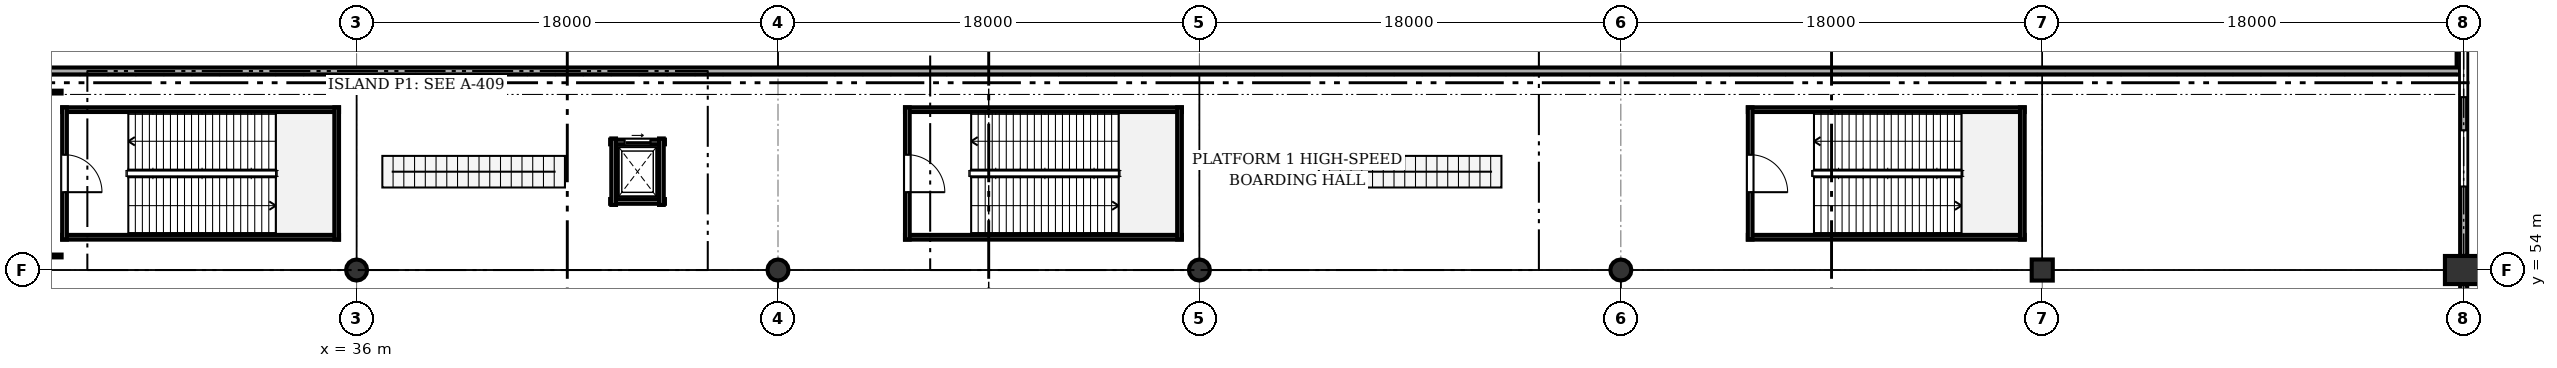
"""IFC4 building model, lengths in metres.
Left out: names, types, materials, properties, quantities, classifications, styles, units other than length and angle.
Written with IfcOpenShell. Run it as: python <this file> out.ifc"""

import sys

from ifc_helpers import new_model, si_unit, direction, frame, frame_2d, origin, origin_2d, place, context, subcontext, project, spatial, rectangle, circle, extrude, element, fill, save


model = new_model("IFC4")
c1 = context("Model", 3, precision=1e-05, world=origin(), true_north=direction((0.0, 1.0)))
c2 = subcontext(c1, "Body", "Model", "MODEL_VIEW")
j1 = project(units=[si_unit("LENGTHUNIT", "METRE"), si_unit("PLANEANGLEUNIT", "RADIAN")], contexts=[c1])
p1 = place(None, origin())
s1 = spatial("IfcSite", under=j1, at=p1, CompositionType="ELEMENT")
p2 = place(p1, origin())
s2 = spatial("IfcBuilding", under=s1, at=p2, CompositionType="ELEMENT")
p3 = place(p2, origin())
s3 = spatial("IfcBuildingStorey", under=s2, at=p3, CompositionType="ELEMENT", Elevation=0.0)
for number, where, z_axis, x_axis in (
    (1, (36.0, 54.0, 0.0), (0.0, 0.0, 1.0), (1.0, 0.0, 0.0)),
    (2, (54.0, 54.0, 0.0), (0.0, 0.0, 1.0), (1.0, 0.0, 0.0)),
    (3, (72.0, 54.0, 0.0), (0.0, 0.0, 1.0), (1.0, 0.0, 0.0)),
    (4, (90.0, 54.0, 0.0), (0.0, 0.0, 1.0), (1.0, 0.0, 0.0)),
):
    element("IfcColumn", number, at=place(p3, frame(where, z_axis=z_axis, x_axis=x_axis)), inside=s3, PredefinedType="COLUMN", context=c2, shape_type="SweptSolid", body=[
        extrude(circle(Radius=0.45, at=origin_2d()), origin(), (0.0, 0.0, 1.0), 6.6),
    ])
p4 = place(p3, frame((108.0, 54.0, 0.0), z_axis=(0.0, 0.0, 1.0), x_axis=(1.0, 0.0, 0.0)))
e5 = element("IfcColumn", 5, at=p4, inside=s3, PredefinedType="COLUMN", context=c2, shape_type="SweptSolid", body=[
    extrude(rectangle(XDim=0.9, YDim=0.9, at=origin_2d()), origin(), (0.0, 0.0, 1.0), 6.6),
])
p5 = place(p3, frame((126.0, 54.0, 0.0), z_axis=(0.0, 0.0, 1.0), x_axis=(1.0, 0.0, 0.0)))
e6 = element("IfcColumn", 6, at=p5, inside=s3, PredefinedType="COLUMN", context=c2, shape_type="SweptSolid", body=[
    extrude(rectangle(XDim=1.6, YDim=1.2, at=origin_2d()), origin(), (0.0, 0.0, 1.0), 6.6),
])
p6 = place(p3, frame((125.85, 62.5, -1.25), z_axis=(0.0, 0.0, 1.0), x_axis=(0.0, 1.0, 0.0)))
e7 = element("IfcWall", 7, at=p6, inside=s3, PredefinedType="SOLIDWALL", context=c2, shape_type="SweptSolid", body=[
    extrude(rectangle(XDim=4.0, YDim=0.3, at=frame_2d((2.0, 0.0))), origin(), (0.0, 0.0, 1.0), 1.23),
])
p7 = place(p3, frame((0.15, 62.5, -1.25), z_axis=(0.0, 0.0, 1.0), x_axis=(1.0, 0.0, 0.0)))
e8 = element("IfcWall", 8, at=p7, inside=s3, PredefinedType="SOLIDWALL", context=c2, shape_type="SweptSolid", body=[
    extrude(rectangle(XDim=125.7, YDim=0.3, at=frame_2d((62.85, 0.0))), origin(), (0.0, 0.0, 1.0), 0.87),
])
p8 = place(p3, frame((126.0, 53.4, 0.0), z_axis=(0.0, 0.0, 1.0), x_axis=(0.0, -1.0, 0.0)))
e9 = element("IfcWall", 9, at=p8, inside=s3, PredefinedType="SOLIDWALL", context=c2, shape_type="SweptSolid", body=[
    extrude(rectangle(XDim=10.8, YDim=0.3, at=frame_2d((5.4, 0.0))), origin(), (0.0, 0.0, 1.0), 6.225),
])
p9 = place(p8, frame((2.467, 0.0, 0.0)))
e10 = element("IfcOpeningElement", 10, at=p9, cuts=e9, PredefinedType="OPENING", context=c2, shape_type="SweptSolid", body=[
    extrude(rectangle(XDim=2.4, YDim=2.5, at=frame_2d((1.2, 1.25))), frame((0.0, 0.16, 0.0), z_axis=(0.0, -1.0, 0.0), x_axis=(1.0, 0.0, 0.0)), (0.0, 0.0, 1.0), 0.32),
])
p10 = place(p8, frame((5.633, 0.0, 0.95)))
e11 = element("IfcOpeningElement", 11, at=p10, cuts=e9, PredefinedType="OPENING", context=c2, shape_type="SweptSolid", body=[
    extrude(rectangle(XDim=3.0, YDim=2.1, at=frame_2d((1.5, 1.05))), frame((0.0, 0.16, 0.0), z_axis=(0.0, -1.0, 0.0), x_axis=(1.0, 0.0, 0.0)), (0.0, 0.0, 1.0), 0.32),
])
p11 = place(p3, frame((126.0, 66.9, 0.0), z_axis=(0.0, 0.0, 1.0), x_axis=(0.0, -1.0, 0.0)))
e12 = element("IfcWall", 12, at=p11, inside=s3, PredefinedType="SOLIDWALL", context=c2, shape_type="SweptSolid", body=[
    extrude(rectangle(XDim=12.3, YDim=0.3, at=frame_2d((6.15, 0.0))), origin(), (0.0, 0.0, 1.0), 5.495),
])
p12 = place(p11, frame((2.817, 0.0, 0.95)))
e13 = element("IfcOpeningElement", 13, at=p12, cuts=e12, PredefinedType="OPENING", context=c2, shape_type="SweptSolid", body=[
    extrude(rectangle(XDim=2.7, YDim=2.1, at=frame_2d((1.35, 1.05))), frame((0.0, 0.16, 0.0), z_axis=(0.0, -1.0, 0.0), x_axis=(1.0, 0.0, 0.0)), (0.0, 0.0, 1.0), 0.32),
])
p13 = place(p11, frame((6.933, 0.0, 0.95)))
e14 = element("IfcOpeningElement", 14, at=p13, cuts=e12, PredefinedType="OPENING", context=c2, shape_type="SweptSolid", body=[
    extrude(rectangle(XDim=2.4, YDim=2.1, at=frame_2d((1.2, 1.05))), frame((0.0, 0.16, 0.0), z_axis=(0.0, -1.0, 0.0), x_axis=(1.0, 0.0, 0.0)), (0.0, 0.0, 1.0), 0.32),
])
for number, where, z_axis, x_axis in (
    (15, (23.425, 55.4, 0.0), (0.0, 0.0, 1.0), (1.0, 0.0, 0.0)),
    (16, (35.25, 60.85, 0.0), (0.0, 0.0, 1.0), (-1.0, 0.0, 0.0)),
):
    element("IfcWall", number, at=place(p3, frame(where, z_axis=z_axis, x_axis=x_axis)), inside=s3, PredefinedType="SOLIDWALL", context=c2, shape_type="SweptSolid", body=[
        extrude(rectangle(XDim=11.825, YDim=0.2, at=frame_2d((5.913, 0.0))), origin(), (0.0, 0.0, 1.0), 6.32),
    ])
p14 = place(p3, frame((35.15, 55.3, 0.0), z_axis=(0.0, 0.0, 1.0), x_axis=(0.0, 1.0, 0.0)))
e17 = element("IfcWall", 17, at=p14, inside=s3, PredefinedType="SOLIDWALL", context=c2, shape_type="SweptSolid", body=[
    extrude(rectangle(XDim=5.65, YDim=0.2, at=frame_2d((2.825, 0.0))), origin(), (0.0, 0.0, 1.0), 6.32),
])
p15 = place(p3, frame((23.525, 60.95, 0.0), z_axis=(0.0, 0.0, 1.0), x_axis=(0.0, -1.0, 0.0)))
e18 = element("IfcWall", 18, at=p15, inside=s3, PredefinedType="SOLIDWALL", context=c2, shape_type="SweptSolid", body=[
    extrude(rectangle(XDim=5.65, YDim=0.2, at=frame_2d((2.825, 0.0))), origin(), (0.0, 0.0, 1.0), 4.4),
])
p16 = place(p15, frame((2.025, 0.0, 0.0)))
e19 = element("IfcOpeningElement", 19, at=p16, cuts=e18, PredefinedType="OPENING", context=c2, shape_type="SweptSolid", body=[
    extrude(rectangle(XDim=1.6, YDim=2.15, at=frame_2d((0.8, 1.075))), frame((0.0, 0.11, 0.0), z_axis=(0.0, -1.0, 0.0), x_axis=(1.0, 0.0, 0.0)), (0.0, 0.0, 1.0), 0.22),
])
for number, where, z_axis, x_axis in (
    (20, (59.425, 55.4, 0.0), (0.0, 0.0, 1.0), (1.0, 0.0, 0.0)),
    (21, (71.25, 60.85, 0.0), (0.0, 0.0, 1.0), (-1.0, 0.0, 0.0)),
):
    element("IfcWall", number, at=place(p3, frame(where, z_axis=z_axis, x_axis=x_axis)), inside=s3, PredefinedType="SOLIDWALL", context=c2, shape_type="SweptSolid", body=[
        extrude(rectangle(XDim=11.825, YDim=0.2, at=frame_2d((5.913, 0.0))), origin(), (0.0, 0.0, 1.0), 6.32),
    ])
p17 = place(p3, frame((71.15, 55.3, 0.0), z_axis=(0.0, 0.0, 1.0), x_axis=(0.0, 1.0, 0.0)))
e22 = element("IfcWall", 22, at=p17, inside=s3, PredefinedType="SOLIDWALL", context=c2, shape_type="SweptSolid", body=[
    extrude(rectangle(XDim=5.65, YDim=0.2, at=frame_2d((2.825, 0.0))), origin(), (0.0, 0.0, 1.0), 6.32),
])
p18 = place(p3, frame((59.525, 60.95, 0.0), z_axis=(0.0, 0.0, 1.0), x_axis=(0.0, -1.0, 0.0)))
e23 = element("IfcWall", 23, at=p18, inside=s3, PredefinedType="SOLIDWALL", context=c2, shape_type="SweptSolid", body=[
    extrude(rectangle(XDim=5.65, YDim=0.2, at=frame_2d((2.825, 0.0))), origin(), (0.0, 0.0, 1.0), 4.4),
])
p19 = place(p18, frame((2.025, 0.0, 0.0)))
e24 = element("IfcOpeningElement", 24, at=p19, cuts=e23, PredefinedType="OPENING", context=c2, shape_type="SweptSolid", body=[
    extrude(rectangle(XDim=1.6, YDim=2.15, at=frame_2d((0.8, 1.075))), frame((0.0, 0.11, 0.0), z_axis=(0.0, -1.0, 0.0), x_axis=(1.0, 0.0, 0.0)), (0.0, 0.0, 1.0), 0.22),
])
for number, where, z_axis, x_axis in (
    (25, (95.425, 55.4, 0.0), (0.0, 0.0, 1.0), (1.0, 0.0, 0.0)),
    (26, (107.25, 60.85, 0.0), (0.0, 0.0, 1.0), (-1.0, 0.0, 0.0)),
):
    element("IfcWall", number, at=place(p3, frame(where, z_axis=z_axis, x_axis=x_axis)), inside=s3, PredefinedType="SOLIDWALL", context=c2, shape_type="SweptSolid", body=[
        extrude(rectangle(XDim=11.825, YDim=0.2, at=frame_2d((5.913, 0.0))), origin(), (0.0, 0.0, 1.0), 6.32),
    ])
p20 = place(p3, frame((107.15, 55.3, 0.0), z_axis=(0.0, 0.0, 1.0), x_axis=(0.0, 1.0, 0.0)))
e27 = element("IfcWall", 27, at=p20, inside=s3, PredefinedType="SOLIDWALL", context=c2, shape_type="SweptSolid", body=[
    extrude(rectangle(XDim=5.65, YDim=0.2, at=frame_2d((2.825, 0.0))), origin(), (0.0, 0.0, 1.0), 6.32),
])
p21 = place(p3, frame((95.525, 60.95, 0.0), z_axis=(0.0, 0.0, 1.0), x_axis=(0.0, -1.0, 0.0)))
e28 = element("IfcWall", 28, at=p21, inside=s3, PredefinedType="SOLIDWALL", context=c2, shape_type="SweptSolid", body=[
    extrude(rectangle(XDim=5.65, YDim=0.2, at=frame_2d((2.825, 0.0))), origin(), (0.0, 0.0, 1.0), 4.4),
])
p22 = place(p21, frame((2.025, 0.0, 0.0)))
e29 = element("IfcOpeningElement", 29, at=p22, cuts=e28, PredefinedType="OPENING", context=c2, shape_type="SweptSolid", body=[
    extrude(rectangle(XDim=1.6, YDim=2.15, at=frame_2d((0.8, 1.075))), frame((0.0, 0.11, 0.0), z_axis=(0.0, -1.0, 0.0), x_axis=(1.0, 0.0, 0.0)), (0.0, 0.0, 1.0), 0.22),
])
p23 = place(p3, frame((46.83, 56.93, 0.0), z_axis=(0.0, 0.0, 1.0), x_axis=(1.0, 0.0, 0.0)))
e30 = element("IfcWall", 30, at=p23, inside=s3, PredefinedType="SOLIDWALL", context=c2, shape_type="SweptSolid", body=[
    extrude(rectangle(XDim=2.34, YDim=0.2, at=frame_2d((1.17, 0.0))), origin(), (0.0, 0.0, 1.0), 4.4),
])
p24 = place(p3, frame((49.17, 59.47, 0.0), z_axis=(0.0, 0.0, 1.0), x_axis=(-1.0, 0.0, 0.0)))
e31 = element("IfcWall", 31, at=p24, inside=s3, PredefinedType="SOLIDWALL", context=c2, shape_type="SweptSolid", body=[
    extrude(rectangle(XDim=2.34, YDim=0.2, at=frame_2d((1.17, 0.0))), origin(), (0.0, 0.0, 1.0), 4.4),
])
p25 = place(p24, frame((0.62, 0.0, 0.0)))
e32 = element("IfcOpeningElement", 32, at=p25, cuts=e31, PredefinedType="OPENING", context=c2, shape_type="SweptSolid", body=[
    extrude(rectangle(XDim=1.1, YDim=2.15, at=frame_2d((0.55, 1.075))), frame((0.0, 0.11, 0.0), z_axis=(0.0, -1.0, 0.0), x_axis=(1.0, 0.0, 0.0)), (0.0, 0.0, 1.0), 0.22),
])
for number, where, z_axis, x_axis in (
    (33, (46.98, 59.62, 0.0), (0.0, 0.0, 1.0), (0.0, -1.0, 0.0)),
    (34, (49.02, 56.78, 0.0), (0.0, 0.0, 1.0), (0.0, 1.0, 0.0)),
):
    element("IfcWall", number, at=place(p3, frame(where, z_axis=z_axis, x_axis=x_axis)), inside=s3, PredefinedType="SOLIDWALL", context=c2, shape_type="SweptSolid", body=[
        extrude(rectangle(XDim=2.84, YDim=0.2, at=frame_2d((1.42, 0.0))), origin(), (0.0, 0.0, 1.0), 4.4),
    ])
for number, where, z_axis, x_axis in (
    (35, (23.4, 54.6, 0.0), (0.0, 0.0, 1.0), (-1.0, 0.0, 0.0)),
    (36, (0.6, 61.6, 0.0), (0.0, 0.0, 1.0), (1.0, 0.0, 0.0)),
):
    element("IfcWall", number, at=place(p3, frame(where, z_axis=z_axis, x_axis=x_axis)), inside=s3, PredefinedType="PARTITIONING", context=c2, shape_type="SweptSolid", body=[
        extrude(rectangle(XDim=22.8, YDim=0.12, at=frame_2d((11.4, 0.0))), origin(), (0.0, 0.0, 1.0), 4.4),
    ])
p26 = place(p12, origin())
e37 = element("IfcWindow", 37, at=p26, inside=s3, PartitioningType="SINGLE_PANEL", PredefinedType="WINDOW", context=c2, shape_type="SweptSolid", body=[
    extrude(rectangle(XDim=2.7, YDim=2.1, at=frame_2d((1.35, 1.05))), frame((0.0, 0.03, 0.0), z_axis=(0.0, -1.0, 0.0), x_axis=(1.0, 0.0, 0.0)), (0.0, 0.0, 1.0), 0.06),
])
fill(e13, e37)
p27 = place(p13, origin())
e38 = element("IfcWindow", 38, at=p27, inside=s3, PartitioningType="SINGLE_PANEL", PredefinedType="WINDOW", context=c2, shape_type="SweptSolid", body=[
    extrude(rectangle(XDim=2.4, YDim=2.1, at=frame_2d((1.2, 1.05))), frame((0.0, 0.03, 0.0), z_axis=(0.0, -1.0, 0.0), x_axis=(1.0, 0.0, 0.0)), (0.0, 0.0, 1.0), 0.06),
])
fill(e14, e38)
p28 = place(p16, origin())
e39 = element("IfcDoor", 39, at=p28, inside=s3, OperationType="SINGLE_SWING_RIGHT", PredefinedType="DOOR", context=c2, shape_type="SweptSolid", body=[
    extrude(rectangle(XDim=1.6, YDim=2.15, at=frame_2d((0.8, 1.075))), frame((0.0, 0.025, 0.0), z_axis=(0.0, -1.0, 0.0), x_axis=(1.0, 0.0, 0.0)), (0.0, 0.0, 1.0), 0.05),
])
fill(e19, e39)
p29 = place(p19, origin())
e40 = element("IfcDoor", 40, at=p29, inside=s3, OperationType="SINGLE_SWING_RIGHT", PredefinedType="DOOR", context=c2, shape_type="SweptSolid", body=[
    extrude(rectangle(XDim=1.6, YDim=2.15, at=frame_2d((0.8, 1.075))), frame((0.0, 0.025, 0.0), z_axis=(0.0, -1.0, 0.0), x_axis=(1.0, 0.0, 0.0)), (0.0, 0.0, 1.0), 0.05),
])
fill(e24, e40)
p30 = place(p22, origin())
e41 = element("IfcDoor", 41, at=p30, inside=s3, OperationType="SINGLE_SWING_RIGHT", PredefinedType="DOOR", context=c2, shape_type="SweptSolid", body=[
    extrude(rectangle(XDim=1.6, YDim=2.15, at=frame_2d((0.8, 1.075))), frame((0.0, 0.025, 0.0), z_axis=(0.0, -1.0, 0.0), x_axis=(1.0, 0.0, 0.0)), (0.0, 0.0, 1.0), 0.05),
])
fill(e29, e41)
p31 = place(p25, origin())
e42 = element("IfcDoor", 42, at=p31, inside=s3, OperationType="SLIDING_TO_LEFT", PredefinedType="DOOR", context=c2, shape_type="SweptSolid", body=[
    extrude(rectangle(XDim=1.1, YDim=2.15, at=frame_2d((0.55, 1.075))), frame((0.0, 0.025, 0.0), z_axis=(0.0, -1.0, 0.0), x_axis=(1.0, 0.0, 0.0)), (0.0, 0.0, 1.0), 0.05),
])
fill(e32, e42)
save(model, sys.argv[1])
